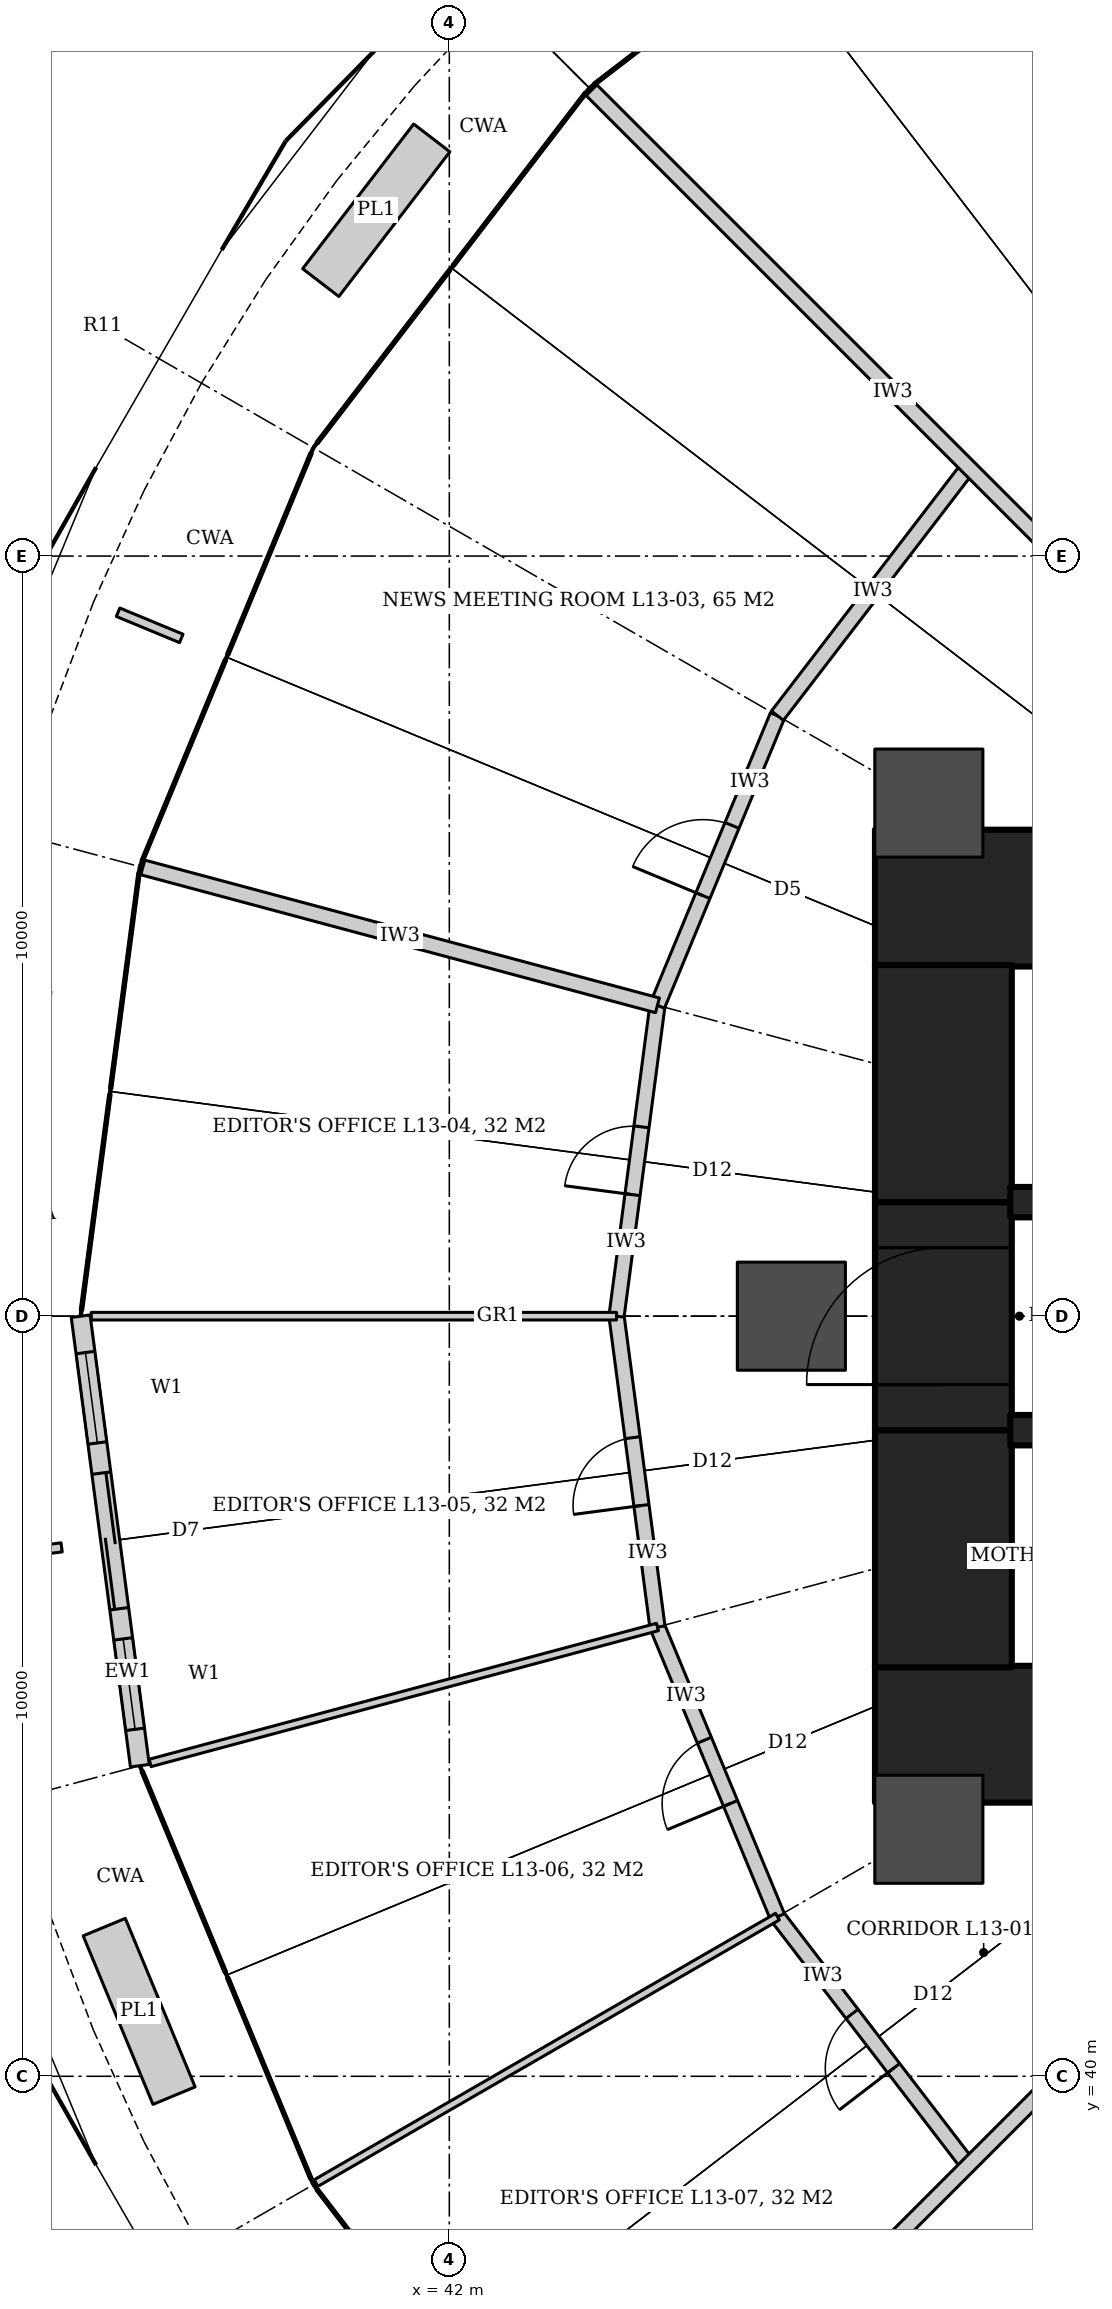
"""IFC4 building model, lengths in metres.
Left out: names, types, materials, properties, quantities, classifications, styles, units other than length and angle.
Written with IfcOpenShell. Run it as: python <this file> out.ifc"""

import sys

from ifc_helpers import new_model, si_unit, direction, frame, frame_2d, origin, origin_2d, place, context, subcontext, project, spatial, rectangle, hollow_circle, extrude, element, fill, save


model = new_model("IFC4")
c1 = context("Model", 3, precision=1e-05, world=origin(), true_north=direction((0.0, 1.0)))
c2 = subcontext(c1, "Body", "Model", "MODEL_VIEW")
j1 = project(units=[si_unit("LENGTHUNIT", "METRE"), si_unit("PLANEANGLEUNIT", "RADIAN")], contexts=[c1])
p1 = place(None, origin())
s1 = spatial("IfcSite", under=j1, at=p1, CompositionType="ELEMENT")
p2 = place(p1, origin())
s2 = spatial("IfcBuilding", under=s1, at=p2, CompositionType="ELEMENT")
p3 = place(p2, frame((0.0, 0.0, 55.4)))
s3 = spatial("IfcBuildingStorey", under=s2, at=p3, CompositionType="ELEMENT", Elevation=55.4)
for number, where, z_axis, x_axis in (
    (1, (47.6, 55.5, 0.0), (0.0, 0.0, 1.0), (1.0, 0.0, 0.0)),
    (2, (47.6, 44.5, 0.0), (0.0, 0.0, 1.0), (1.0, 0.0, 0.0)),
):
    element("IfcWall", number, at=place(p3, frame(where, z_axis=z_axis, x_axis=x_axis)), inside=s3, PredefinedType="SHEAR", context=c2, shape_type="SweptSolid", body=[
        extrude(rectangle(XDim=7.8, YDim=1.8, at=frame_2d((3.9, 0.0))), origin(), (0.0, 0.0, 1.0), 4.2),
    ])
p4 = place(p3, frame((48.5, 45.38, 0.0), z_axis=(0.0, 0.0, 1.0), x_axis=(0.0, 1.0, 0.0)))
e3 = element("IfcWall", 3, at=p4, inside=s3, PredefinedType="SHEAR", context=c2, shape_type="SweptSolid", body=[
    extrude(rectangle(XDim=3.12, YDim=1.8, at=frame_2d((1.56, 0.0))), origin(), (0.0, 0.0, 1.0), 4.2),
])
p5 = place(p3, frame((48.5, 48.5, 0.0), z_axis=(0.0, 0.0, 1.0), x_axis=(0.0, 1.0, 0.0)))
e4 = element("IfcWall", 4, at=p5, inside=s3, PredefinedType="SHEAR", context=c2, shape_type="SweptSolid", body=[
    extrude(rectangle(XDim=3.0, YDim=1.8, at=frame_2d((1.5, 0.0))), origin(), (0.0, 0.0, 1.0), 4.2),
])
p6 = place(p5, frame((0.6, 0.0, 0.0)))
e5 = element("IfcOpeningElement", 5, at=p6, cuts=e4, PredefinedType="OPENING", context=c2, shape_type="SweptSolid", body=[
    extrude(rectangle(XDim=1.8, YDim=2.1, at=frame_2d((0.9, 1.05))), frame((0.0, 0.91, 0.0), z_axis=(0.0, -1.0, 0.0), x_axis=(1.0, 0.0, 0.0)), (0.0, 0.0, 1.0), 1.82),
])
p7 = place(p3, frame((48.5, 51.5, 0.0), z_axis=(0.0, 0.0, 1.0), x_axis=(0.0, 1.0, 0.0)))
e6 = element("IfcWall", 6, at=p7, inside=s3, PredefinedType="SHEAR", context=c2, shape_type="SweptSolid", body=[
    extrude(rectangle(XDim=3.12, YDim=1.8, at=frame_2d((1.56, 0.0))), origin(), (0.0, 0.0, 1.0), 4.2),
])
p8 = place(p3, frame((49.38, 51.5, 0.0), z_axis=(0.0, 0.0, 1.0), x_axis=(1.0, 0.0, 0.0)))
e7 = element("IfcWall", 7, at=p8, inside=s3, PredefinedType="SHEAR", context=c2, shape_type="SweptSolid", body=[
    extrude(rectangle(XDim=6.02, YDim=0.4, at=frame_2d((3.01, 0.0))), origin(), (0.0, 0.0, 1.0), 4.2),
])
p9 = place(p8, frame((4.52, 0.0, 0.0)))
e8 = element("IfcOpeningElement", 8, at=p9, cuts=e7, PredefinedType="OPENING", context=c2, shape_type="SweptSolid", body=[
    extrude(rectangle(XDim=1.0, YDim=2.1, at=frame_2d((0.5, 1.05))), frame((0.0, 0.21, 0.0), z_axis=(0.0, -1.0, 0.0), x_axis=(1.0, 0.0, 0.0)), (0.0, 0.0, 1.0), 0.42),
])
p10 = place(p3, frame((49.38, 48.5, 0.0), z_axis=(0.0, 0.0, 1.0), x_axis=(1.0, 0.0, 0.0)))
e9 = element("IfcWall", 9, at=p10, inside=s3, PredefinedType="SHEAR", context=c2, shape_type="SweptSolid", body=[
    extrude(rectangle(XDim=6.02, YDim=0.4, at=frame_2d((3.01, 0.0))), origin(), (0.0, 0.0, 1.0), 4.2),
])
p11 = place(p10, frame((0.47, 0.0, 0.0)))
e10 = element("IfcOpeningElement", 10, at=p11, cuts=e9, PredefinedType="OPENING", context=c2, shape_type="SweptSolid", body=[
    extrude(rectangle(XDim=0.9, YDim=2.1, at=frame_2d((0.45, 1.05))), frame((0.0, 0.21, 0.0), z_axis=(0.0, -1.0, 0.0), x_axis=(1.0, 0.0, 0.0)), (0.0, 0.0, 1.0), 0.42),
])
p12 = place(p10, frame((2.27, 0.0, 0.0)))
e11 = element("IfcOpeningElement", 11, at=p12, cuts=e9, PredefinedType="OPENING", context=c2, shape_type="SweptSolid", body=[
    extrude(rectangle(XDim=0.9, YDim=2.1, at=frame_2d((0.45, 1.05))), frame((0.0, 0.21, 0.0), z_axis=(0.0, -1.0, 0.0), x_axis=(1.0, 0.0, 0.0)), (0.0, 0.0, 1.0), 0.42),
])
p13 = place(p10, frame((4.22, 0.0, 0.0)))
e12 = element("IfcOpeningElement", 12, at=p13, cuts=e9, PredefinedType="OPENING", context=c2, shape_type="SweptSolid", body=[
    extrude(rectangle(XDim=1.0, YDim=2.1, at=frame_2d((0.5, 1.05))), frame((0.0, 0.21, 0.0), z_axis=(0.0, -1.0, 0.0), x_axis=(1.0, 0.0, 0.0)), (0.0, 0.0, 1.0), 0.42),
])
for number, where, z_axis, x_axis in (
    (13, (48.309, 56.75, 0.0), (0.0, 0.0, 1.0), (1.0, 0.0, 0.0)),
    (14, (46.5, 50.0, 0.0), (0.0, 0.0, 1.0), (1.0, 0.0, 0.0)),
    (15, (48.309, 43.25, 0.0), (0.0, 0.0, 1.0), (1.0, 0.0, 0.0)),
):
    element("IfcColumn", number, at=place(p3, frame(where, z_axis=z_axis, x_axis=x_axis)), inside=s3, PredefinedType="COLUMN", context=c2, shape_type="SweptSolid", body=[
        extrude(hollow_circle(Radius=0.711, WallThickness=0.07, at=origin_2d()), origin(), (0.0, 0.0, 1.0), 4.2),
    ])
p14 = place(p3, frame((48.828, 38.828, 0.0), z_axis=(0.0, 0.0, 1.0), x_axis=(-0.608714823874, 0.793389099494, 0.0)))
e16 = element("IfcWall", 16, at=p14, inside=s3, PredefinedType="PARTITIONING", context=c2, shape_type="SweptSolid", body=[
    extrude(rectangle(XDim=4.125, YDim=0.2, at=frame_2d((2.062, 0.0))), origin(), (0.0, 0.0, 1.0), 3.04),
])
p15 = place(p14, frame((1.612, 0.0, 0.0)))
e17 = element("IfcOpeningElement", 17, at=p15, cuts=e16, PredefinedType="OPENING", context=c2, shape_type="SweptSolid", body=[
    extrude(rectangle(XDim=0.9, YDim=2.4, at=frame_2d((0.45, 1.2))), frame((0.0, 0.11, 0.0), z_axis=(0.0, -1.0, 0.0), x_axis=(1.0, 0.0, 0.0)), (0.0, 0.0, 1.0), 0.22),
])
p16 = place(p3, frame((46.317, 42.1, 0.0), z_axis=(0.0, 0.0, 1.0), x_axis=(-0.382731667114, 0.923859551549, 0.0)))
e18 = element("IfcWall", 18, at=p16, inside=s3, PredefinedType="PARTITIONING", context=c2, shape_type="SweptSolid", body=[
    extrude(rectangle(XDim=4.125, YDim=0.2, at=frame_2d((2.062, 0.0))), origin(), (0.0, 0.0, 1.0), 3.04),
])
p17 = place(p16, frame((1.612, 0.0, 0.0)))
e19 = element("IfcOpeningElement", 19, at=p17, cuts=e18, PredefinedType="OPENING", context=c2, shape_type="SweptSolid", body=[
    extrude(rectangle(XDim=0.9, YDim=2.4, at=frame_2d((0.45, 1.2))), frame((0.0, 0.11, 0.0), z_axis=(0.0, -1.0, 0.0), x_axis=(1.0, 0.0, 0.0)), (0.0, 0.0, 1.0), 0.22),
])
p18 = place(p3, frame((44.738, 45.911, 0.0), z_axis=(0.0, 0.0, 1.0), x_axis=(-0.130515758099, 0.991446234996, 0.0)))
e20 = element("IfcWall", 20, at=p18, inside=s3, PredefinedType="PARTITIONING", context=c2, shape_type="SweptSolid", body=[
    extrude(rectangle(XDim=4.125, YDim=0.2, at=frame_2d((2.062, 0.0))), origin(), (0.0, 0.0, 1.0), 3.04),
])
p19 = place(p18, frame((1.612, 0.0, 0.0)))
e21 = element("IfcOpeningElement", 21, at=p19, cuts=e20, PredefinedType="OPENING", context=c2, shape_type="SweptSolid", body=[
    extrude(rectangle(XDim=0.9, YDim=2.4, at=frame_2d((0.45, 1.2))), frame((0.0, 0.11, 0.0), z_axis=(0.0, -1.0, 0.0), x_axis=(1.0, 0.0, 0.0)), (0.0, 0.0, 1.0), 0.22),
])
p20 = place(p3, frame((44.2, 50.0, 0.0), z_axis=(0.0, 0.0, 1.0), x_axis=(0.130515758099, 0.991446234996, 0.0)))
e22 = element("IfcWall", 22, at=p20, inside=s3, PredefinedType="PARTITIONING", context=c2, shape_type="SweptSolid", body=[
    extrude(rectangle(XDim=4.125, YDim=0.2, at=frame_2d((2.062, 0.0))), origin(), (0.0, 0.0, 1.0), 3.04),
])
p21 = place(p20, frame((1.612, 0.0, 0.0)))
e23 = element("IfcOpeningElement", 23, at=p21, cuts=e22, PredefinedType="OPENING", context=c2, shape_type="SweptSolid", body=[
    extrude(rectangle(XDim=0.9, YDim=2.4, at=frame_2d((0.45, 1.2))), frame((0.0, 0.11, 0.0), z_axis=(0.0, -1.0, 0.0), x_axis=(1.0, 0.0, 0.0)), (0.0, 0.0, 1.0), 0.22),
])
p22 = place(p3, frame((44.738, 54.089, 0.0), z_axis=(0.0, 0.0, 1.0), x_axis=(0.382731667114, 0.923859551549, 0.0)))
e24 = element("IfcWall", 24, at=p22, inside=s3, PredefinedType="PARTITIONING", context=c2, shape_type="SweptSolid", body=[
    extrude(rectangle(XDim=4.125, YDim=0.2, at=frame_2d((2.062, 0.0))), origin(), (0.0, 0.0, 1.0), 3.04),
])
p23 = place(p22, frame((1.562, 0.0, 0.0)))
e25 = element("IfcOpeningElement", 25, at=p23, cuts=e24, PredefinedType="OPENING", context=c2, shape_type="SweptSolid", body=[
    extrude(rectangle(XDim=1.0, YDim=2.1, at=frame_2d((0.5, 1.05))), frame((0.0, 0.11, 0.0), z_axis=(0.0, -1.0, 0.0), x_axis=(1.0, 0.0, 0.0)), (0.0, 0.0, 1.0), 0.22),
])
p24 = place(p3, frame((46.317, 57.9, 0.0), z_axis=(0.0, 0.0, 1.0), x_axis=(0.608714823874, 0.793389099494, 0.0)))
e26 = element("IfcWall", 26, at=p24, inside=s3, PredefinedType="PARTITIONING", context=c2, shape_type="SweptSolid", body=[
    extrude(rectangle(XDim=4.125, YDim=0.2, at=frame_2d((2.062, 0.0))), origin(), (0.0, 0.0, 1.0), 3.04),
])
p25 = place(p3, frame((51.8, 58.2, 0.0), z_axis=(0.0, 0.0, 1.0), x_axis=(-0.707106781187, 0.707106781187, 0.0)))
e27 = element("IfcWall", 27, at=p25, inside=s3, PredefinedType="PARTITIONING", context=c2, shape_type="SweptSolid", body=[
    extrude(rectangle(XDim=10.864, YDim=0.2, at=frame_2d((5.432, 0.0))), origin(), (0.0, 0.0, 1.0), 3.02),
])
p26 = place(p3, frame((44.738, 54.089, 0.0), z_axis=(0.0, 0.0, 1.0), x_axis=(-0.965927597549, 0.258812434578, 0.0)))
e28 = element("IfcWall", 28, at=p26, inside=s3, PredefinedType="PARTITIONING", context=c2, shape_type="SweptSolid", body=[
    extrude(rectangle(XDim=6.66, YDim=0.2, at=frame_2d((3.33, 0.0))), origin(), (0.0, 0.0, 1.0), 3.04),
])
p27 = place(p3, frame((44.2, 50.0, 0.0), z_axis=(0.0, 0.0, 1.0), x_axis=(-1.0, 0.0, 0.0)))
e29 = element("IfcWall", 29, at=p27, inside=s3, PredefinedType="PARTITIONING", context=c2, shape_type="SweptSolid", body=[
    extrude(rectangle(XDim=6.56, YDim=0.1, at=frame_2d((3.28, 0.0))), origin(), (0.0, 0.0, 1.0), 3.04),
])
p28 = place(p3, frame((44.738, 45.911, 0.0), z_axis=(0.0, 0.0, 1.0), x_axis=(-0.965929113775, -0.258806775726, 0.0)))
e30 = element("IfcWall", 30, at=p28, inside=s3, PredefinedType="PARTITIONING", context=c2, shape_type="SweptSolid", body=[
    extrude(rectangle(XDim=6.56, YDim=0.1, at=frame_2d((3.28, 0.0))), origin(), (0.0, 0.0, 1.0), 3.04),
])
p29 = place(p3, frame((46.317, 42.1, 0.0), z_axis=(0.0, 0.0, 1.0), x_axis=(-0.866023818221, -0.500002746266, 0.0)))
e31 = element("IfcWall", 31, at=p29, inside=s3, PredefinedType="PARTITIONING", context=c2, shape_type="SweptSolid", body=[
    extrude(rectangle(XDim=6.66, YDim=0.1, at=frame_2d((3.33, 0.0))), origin(), (0.0, 0.0, 1.0), 3.04),
])
p30 = place(p3, frame((51.8, 41.8, 0.0), z_axis=(0.0, 0.0, 1.0), x_axis=(-0.707106781187, -0.707106781187, 0.0)))
e32 = element("IfcWall", 32, at=p30, inside=s3, PredefinedType="PARTITIONING", context=c2, shape_type="SweptSolid", body=[
    extrude(rectangle(XDim=10.864, YDim=0.2, at=frame_2d((5.432, 0.0))), origin(), (0.0, 0.0, 1.0), 3.02),
])
p31 = place(p30, frame((1.602, 0.0, 0.0)))
e33 = element("IfcOpeningElement", 33, at=p31, cuts=e32, PredefinedType="OPENING", context=c2, shape_type="SweptSolid", body=[
    extrude(rectangle(XDim=1.0, YDim=2.1, at=frame_2d((0.5, 1.05))), frame((0.0, 0.11, 0.0), z_axis=(0.0, -1.0, 0.0), x_axis=(1.0, 0.0, 0.0)), (0.0, 0.0, 1.0), 0.22),
])
p32 = place(p3, frame((37.5, 50.0, 0.0), z_axis=(0.0, 0.0, 1.0), x_axis=(0.13051364818, -0.991446512747, 0.0)))
e34 = element("IfcWall", 34, at=p32, inside=s3, PredefinedType="SOLIDWALL", context=c2, shape_type="SweptSolid", body=[
    extrude(rectangle(XDim=5.874, YDim=0.25, at=frame_2d((2.937, 0.0))), origin(), (0.0, 0.0, 1.0), 4.04),
])
p33 = place(p32, frame((2.037, 0.0, 0.0)))
e35 = element("IfcOpeningElement", 35, at=p33, cuts=e34, PredefinedType="OPENING", context=c2, shape_type="SweptSolid", body=[
    extrude(rectangle(XDim=1.8, YDim=2.4, at=frame_2d((0.9, 1.2))), frame((0.0, 0.135, 0.0), z_axis=(0.0, -1.0, 0.0), x_axis=(1.0, 0.0, 0.0)), (0.0, 0.0, 1.0), 0.27),
])
p34 = place(p32, frame((0.437, 0.0, 0.0)))
e36 = element("IfcOpeningElement", 36, at=p34, cuts=e34, PredefinedType="OPENING", context=c2, shape_type="SweptSolid", body=[
    extrude(rectangle(XDim=1.2, YDim=2.4, at=frame_2d((0.6, 1.2))), frame((0.0, 0.135, 0.0), z_axis=(0.0, -1.0, 0.0), x_axis=(1.0, 0.0, 0.0)), (0.0, 0.0, 1.0), 0.27),
])
p35 = place(p32, frame((4.237, 0.0, 0.0)))
e37 = element("IfcOpeningElement", 37, at=p35, cuts=e34, PredefinedType="OPENING", context=c2, shape_type="SweptSolid", body=[
    extrude(rectangle(XDim=1.2, YDim=2.4, at=frame_2d((0.6, 1.2))), frame((0.0, 0.135, 0.0), z_axis=(0.0, -1.0, 0.0), x_axis=(1.0, 0.0, 0.0)), (0.0, 0.0, 1.0), 0.27),
])
p36 = place(p23, origin())
e38 = element("IfcDoor", 38, at=p36, inside=s3, OperationType="SINGLE_SWING_LEFT", PredefinedType="DOOR", context=c2, shape_type="SweptSolid", body=[
    extrude(rectangle(XDim=1.0, YDim=2.1, at=frame_2d((0.5, 1.05))), frame((0.0, 0.025, 0.0), z_axis=(0.0, -1.0, 0.0), x_axis=(1.0, 0.0, 0.0)), (0.0, 0.0, 1.0), 0.05),
])
fill(e25, e38)
p37 = place(p21, origin())
e39 = element("IfcDoor", 39, at=p37, inside=s3, OperationType="SINGLE_SWING_LEFT", PredefinedType="DOOR", context=c2, shape_type="SweptSolid", body=[
    extrude(rectangle(XDim=0.9, YDim=2.4, at=frame_2d((0.45, 1.2))), frame((0.0, 0.025, 0.0), z_axis=(0.0, -1.0, 0.0), x_axis=(1.0, 0.0, 0.0)), (0.0, 0.0, 1.0), 0.05),
])
fill(e23, e39)
p38 = place(p19, origin())
e40 = element("IfcDoor", 40, at=p38, inside=s3, OperationType="SINGLE_SWING_LEFT", PredefinedType="DOOR", context=c2, shape_type="SweptSolid", body=[
    extrude(rectangle(XDim=0.9, YDim=2.4, at=frame_2d((0.45, 1.2))), frame((0.0, 0.025, 0.0), z_axis=(0.0, -1.0, 0.0), x_axis=(1.0, 0.0, 0.0)), (0.0, 0.0, 1.0), 0.05),
])
fill(e21, e40)
p39 = place(p17, origin())
e41 = element("IfcDoor", 41, at=p39, inside=s3, OperationType="SINGLE_SWING_LEFT", PredefinedType="DOOR", context=c2, shape_type="SweptSolid", body=[
    extrude(rectangle(XDim=0.9, YDim=2.4, at=frame_2d((0.45, 1.2))), frame((0.0, 0.025, 0.0), z_axis=(0.0, -1.0, 0.0), x_axis=(1.0, 0.0, 0.0)), (0.0, 0.0, 1.0), 0.05),
])
fill(e19, e41)
p40 = place(p15, origin())
e42 = element("IfcDoor", 42, at=p40, inside=s3, OperationType="SINGLE_SWING_LEFT", PredefinedType="DOOR", context=c2, shape_type="SweptSolid", body=[
    extrude(rectangle(XDim=0.9, YDim=2.4, at=frame_2d((0.45, 1.2))), frame((0.0, 0.025, 0.0), z_axis=(0.0, -1.0, 0.0), x_axis=(1.0, 0.0, 0.0)), (0.0, 0.0, 1.0), 0.05),
])
fill(e17, e42)
p41 = place(p33, origin())
e43 = element("IfcDoor", 43, at=p41, inside=s3, OperationType="DOUBLE_DOOR_SLIDING", PredefinedType="DOOR", context=c2, shape_type="SweptSolid", body=[
    extrude(rectangle(XDim=1.8, YDim=2.4, at=frame_2d((0.9, 1.2))), frame((0.0, 0.025, 0.0), z_axis=(0.0, -1.0, 0.0), x_axis=(1.0, 0.0, 0.0)), (0.0, 0.0, 1.0), 0.05),
])
fill(e35, e43)
p42 = place(p34, origin())
e44 = element("IfcWindow", 44, at=p42, inside=s3, PartitioningType="SINGLE_PANEL", PredefinedType="WINDOW", context=c2, shape_type="SweptSolid", body=[
    extrude(rectangle(XDim=1.2, YDim=2.4, at=frame_2d((0.6, 1.2))), frame((0.0, 0.03, 0.0), z_axis=(0.0, -1.0, 0.0), x_axis=(1.0, 0.0, 0.0)), (0.0, 0.0, 1.0), 0.06),
])
fill(e36, e44)
p43 = place(p35, origin())
e45 = element("IfcWindow", 45, at=p43, inside=s3, PartitioningType="SINGLE_PANEL", PredefinedType="WINDOW", context=c2, shape_type="SweptSolid", body=[
    extrude(rectangle(XDim=1.2, YDim=2.4, at=frame_2d((0.6, 1.2))), frame((0.0, 0.03, 0.0), z_axis=(0.0, -1.0, 0.0), x_axis=(1.0, 0.0, 0.0)), (0.0, 0.0, 1.0), 0.06),
])
fill(e37, e45)
p44 = place(p6, origin())
e46 = element("IfcDoor", 46, at=p44, inside=s3, OperationType="DOUBLE_DOOR_DOUBLE_SWING", PredefinedType="DOOR", context=c2, shape_type="SweptSolid", body=[
    extrude(rectangle(XDim=1.8, YDim=2.1, at=frame_2d((0.9, 1.05))), frame((0.0, 0.025, 0.0), z_axis=(0.0, -1.0, 0.0), x_axis=(1.0, 0.0, 0.0)), (0.0, 0.0, 1.0), 0.05),
])
fill(e5, e46)
save(model, sys.argv[1])
